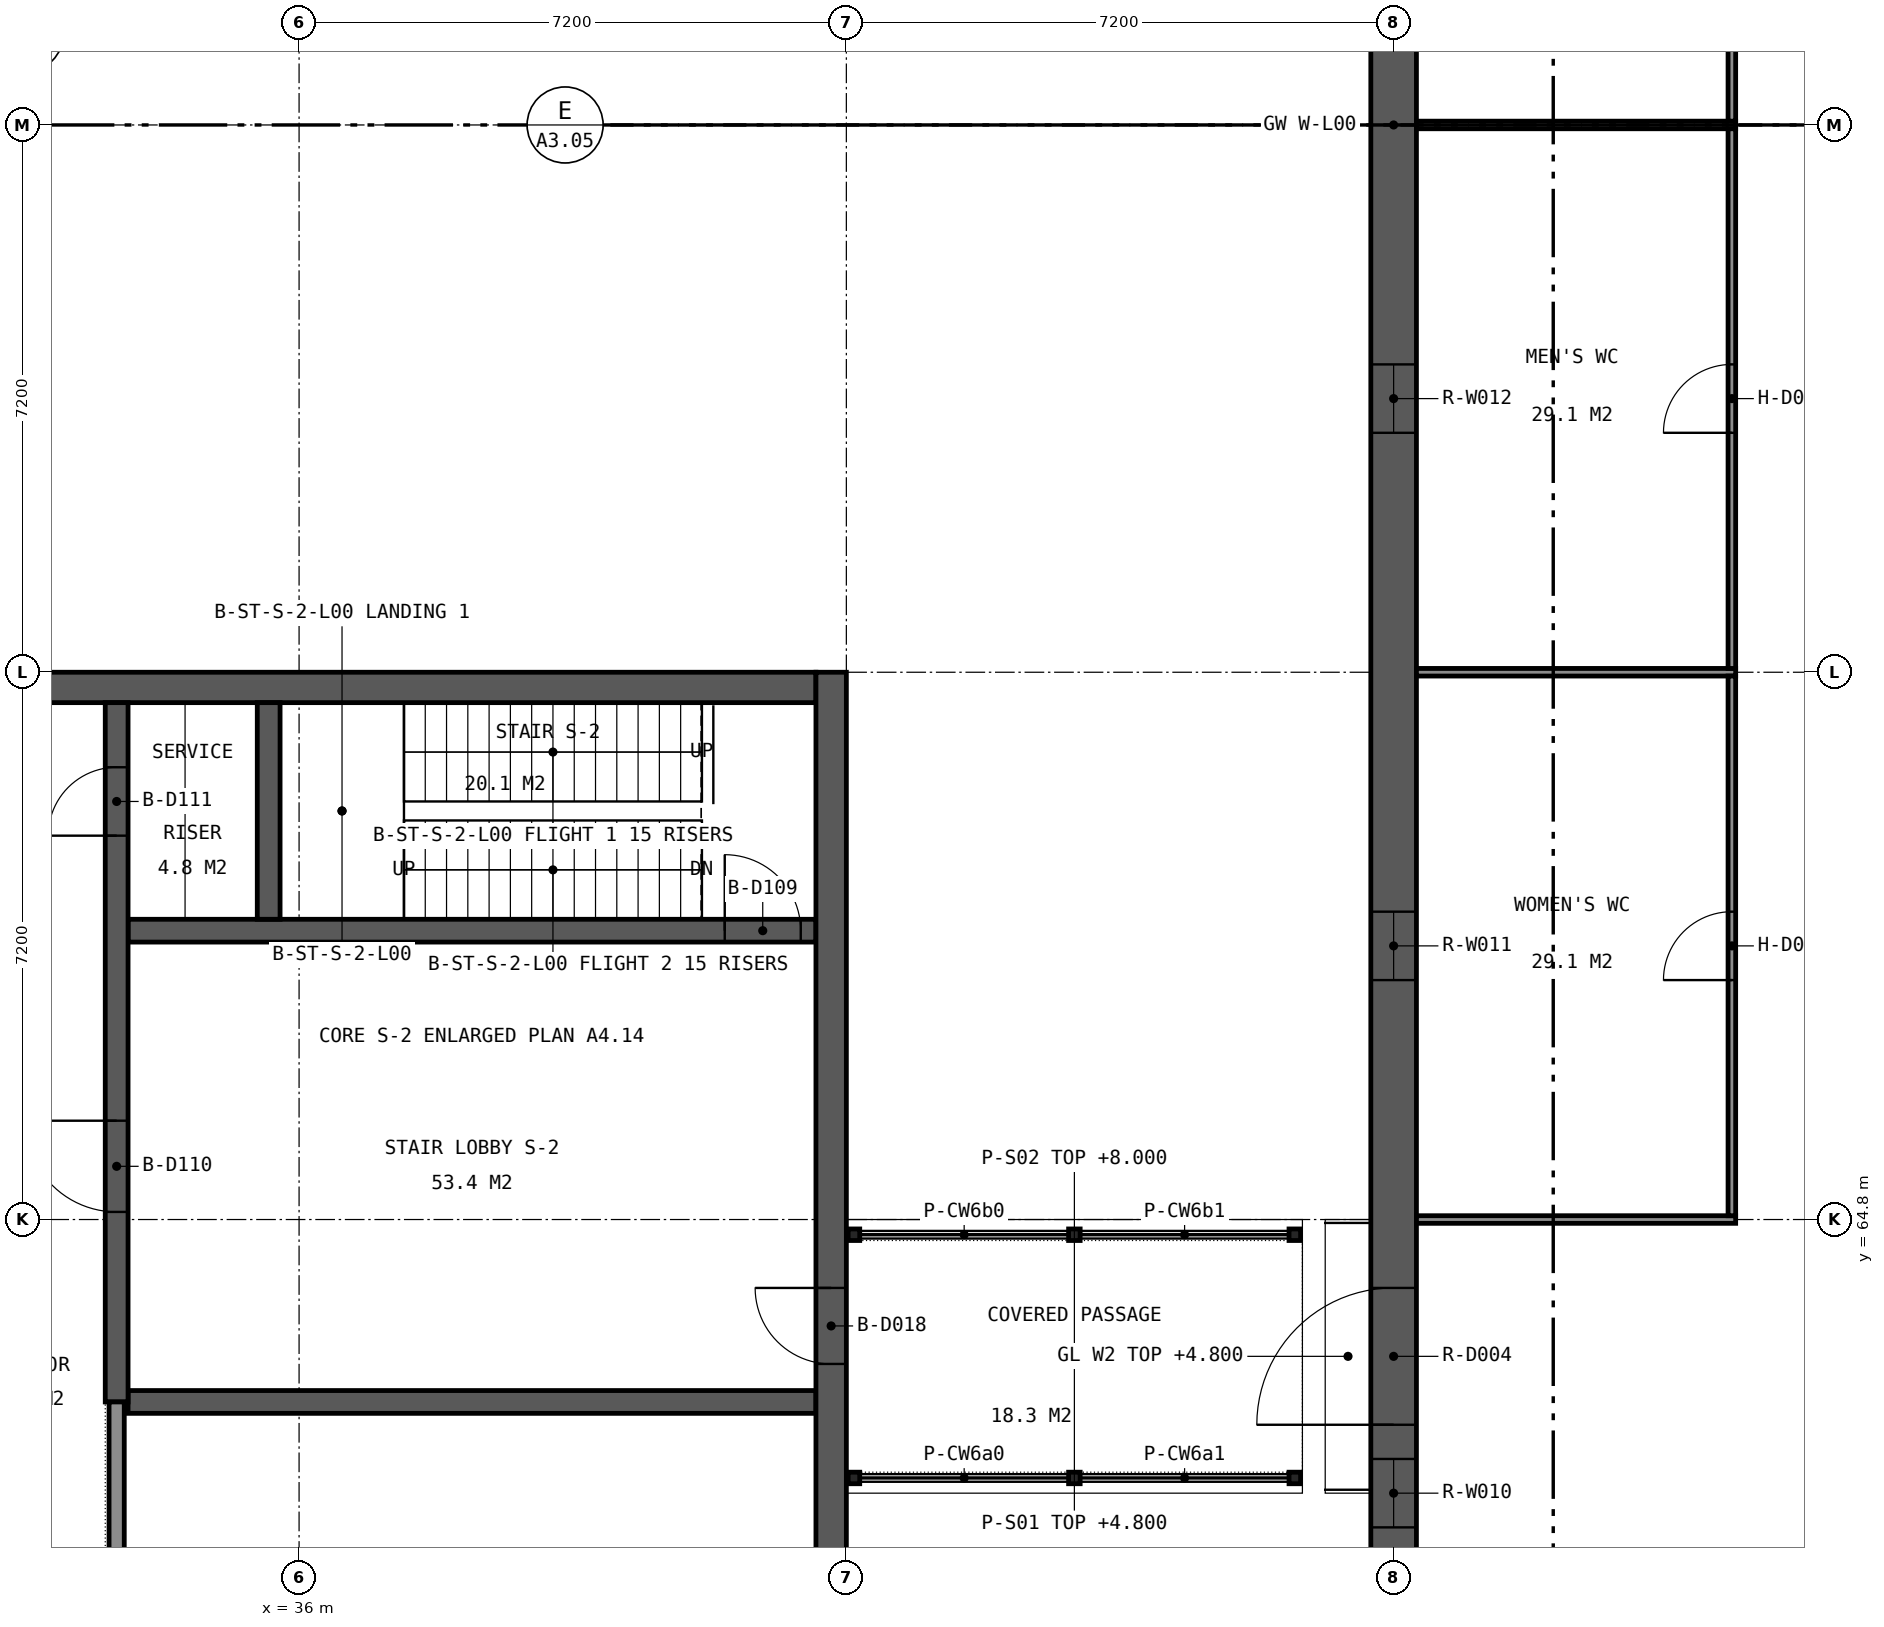
"""IFC4 building model, lengths in metres.
Left out: names, types, materials, properties, quantities, classifications, styles, units other than length and angle.
Written with IfcOpenShell. Run it as: python <this file> out.ifc"""

import sys

from ifc_helpers import new_model, si_unit, direction, frame, frame_2d, origin, origin_2d, place, context, subcontext, project, spatial, rectangle, hollow_rectangle, extrude, element, fill, save


model = new_model("IFC4")
c1 = context("Model", 3, precision=1e-05, world=origin(), true_north=direction((0.0, 1.0)))
c2 = subcontext(c1, "Body", "Model", "MODEL_VIEW")
j1 = project(units=[si_unit("LENGTHUNIT", "METRE"), si_unit("PLANEANGLEUNIT", "RADIAN")], contexts=[c1])
p1 = place(None, origin())
s1 = spatial("IfcSite", under=j1, at=p1, CompositionType="ELEMENT")
p2 = place(p1, origin())
s2 = spatial("IfcBuilding", under=s1, at=p2, CompositionType="ELEMENT")
p3 = place(p2, frame((0.0, 0.0, 4.8)))
s3 = spatial("IfcBuildingStorey", under=s2, at=p3, CompositionType="ELEMENT", Elevation=4.8)
p4 = place(p3, frame((50.4, 52.2, 0.0), z_axis=(0.0, 0.0, 1.0), x_axis=(0.0, 1.0, 0.0)))
e1 = element("IfcWall", 1, at=p4, inside=s3, PredefinedType="SOLIDWALL", context=c2, shape_type="SweptSolid", body=[
    extrude(rectangle(XDim=54.0, YDim=0.6, at=frame_2d((27.0, 0.0))), origin(), (0.0, 0.0, 1.0), 4.8),
])
p5 = place(p4, frame((1.35, 0.0, 0.9)))
e2 = element("IfcOpeningElement", 2, at=p5, cuts=e1, PredefinedType="OPENING", context=c2, shape_type="SweptSolid", body=[
    extrude(rectangle(XDim=0.9, YDim=3.3, at=frame_2d((0.45, 1.65))), frame((0.0, 0.31, 0.0), z_axis=(0.0, -1.0, 0.0), x_axis=(1.0, 0.0, 0.0)), (0.0, 0.0, 1.0), 0.62),
])
p6 = place(p4, frame((8.55, 0.0, 0.9)))
e3 = element("IfcOpeningElement", 3, at=p6, cuts=e1, PredefinedType="OPENING", context=c2, shape_type="SweptSolid", body=[
    extrude(rectangle(XDim=0.9, YDim=3.3, at=frame_2d((0.45, 1.65))), frame((0.0, 0.31, 0.0), z_axis=(0.0, -1.0, 0.0), x_axis=(1.0, 0.0, 0.0)), (0.0, 0.0, 1.0), 0.62),
])
p7 = place(p4, frame((15.75, 0.0, 0.9)))
e4 = element("IfcOpeningElement", 4, at=p7, cuts=e1, PredefinedType="OPENING", context=c2, shape_type="SweptSolid", body=[
    extrude(rectangle(XDim=0.9, YDim=3.3, at=frame_2d((0.45, 1.65))), frame((0.0, 0.31, 0.0), z_axis=(0.0, -1.0, 0.0), x_axis=(1.0, 0.0, 0.0)), (0.0, 0.0, 1.0), 0.62),
])
p8 = place(p4, frame((22.95, 0.0, 0.9)))
e5 = element("IfcOpeningElement", 5, at=p8, cuts=e1, PredefinedType="OPENING", context=c2, shape_type="SweptSolid", body=[
    extrude(rectangle(XDim=0.9, YDim=3.3, at=frame_2d((0.45, 1.65))), frame((0.0, 0.31, 0.0), z_axis=(0.0, -1.0, 0.0), x_axis=(1.0, 0.0, 0.0)), (0.0, 0.0, 1.0), 0.62),
])
p9 = place(p4, frame((30.15, 0.0, 0.9)))
e6 = element("IfcOpeningElement", 6, at=p9, cuts=e1, PredefinedType="OPENING", context=c2, shape_type="SweptSolid", body=[
    extrude(rectangle(XDim=0.9, YDim=3.3, at=frame_2d((0.45, 1.65))), frame((0.0, 0.31, 0.0), z_axis=(0.0, -1.0, 0.0), x_axis=(1.0, 0.0, 0.0)), (0.0, 0.0, 1.0), 0.62),
])
p10 = place(p4, frame((37.35, 0.0, 0.9)))
e7 = element("IfcOpeningElement", 7, at=p10, cuts=e1, PredefinedType="OPENING", context=c2, shape_type="SweptSolid", body=[
    extrude(rectangle(XDim=0.9, YDim=3.3, at=frame_2d((0.45, 1.65))), frame((0.0, 0.31, 0.0), z_axis=(0.0, -1.0, 0.0), x_axis=(1.0, 0.0, 0.0)), (0.0, 0.0, 1.0), 0.62),
])
p11 = place(p4, frame((44.55, 0.0, 0.9)))
e8 = element("IfcOpeningElement", 8, at=p11, cuts=e1, PredefinedType="OPENING", context=c2, shape_type="SweptSolid", body=[
    extrude(rectangle(XDim=0.9, YDim=3.3, at=frame_2d((0.45, 1.65))), frame((0.0, 0.31, 0.0), z_axis=(0.0, -1.0, 0.0), x_axis=(1.0, 0.0, 0.0)), (0.0, 0.0, 1.0), 0.62),
])
p12 = place(p4, frame((51.75, 0.0, 0.9)))
e9 = element("IfcOpeningElement", 9, at=p12, cuts=e1, PredefinedType="OPENING", context=c2, shape_type="SweptSolid", body=[
    extrude(rectangle(XDim=0.9, YDim=3.3, at=frame_2d((0.45, 1.65))), frame((0.0, 0.31, 0.0), z_axis=(0.0, -1.0, 0.0), x_axis=(1.0, 0.0, 0.0)), (0.0, 0.0, 1.0), 0.62),
])
p13 = place(p4, frame((9.9, 0.0, 0.0)))
e10 = element("IfcOpeningElement", 10, at=p13, cuts=e1, PredefinedType="OPENING", context=c2, shape_type="SweptSolid", body=[
    extrude(rectangle(XDim=1.8, YDim=2.4, at=frame_2d((0.9, 1.2))), frame((0.0, 0.31, 0.0), z_axis=(0.0, -1.0, 0.0), x_axis=(1.0, 0.0, 0.0)), (0.0, 0.0, 1.0), 0.62),
])
p14 = place(p4, frame((42.3, 0.0, 0.0)))
e11 = element("IfcOpeningElement", 11, at=p14, cuts=e1, PredefinedType="OPENING", context=c2, shape_type="SweptSolid", body=[
    extrude(rectangle(XDim=1.8, YDim=2.4, at=frame_2d((0.9, 1.2))), frame((0.0, 0.31, 0.0), z_axis=(0.0, -1.0, 0.0), x_axis=(1.0, 0.0, 0.0)), (0.0, 0.0, 1.0), 0.62),
])
p15 = place(p3, frame((33.75, 62.4, 0.0), z_axis=(0.0, 0.0, 1.0), x_axis=(1.0, 0.0, 0.0)))
e12 = element("IfcWall", 12, at=p15, inside=s3, PredefinedType="SHEAR", context=c2, shape_type="SweptSolid", body=[
    extrude(rectangle(XDim=9.05, YDim=0.3, at=frame_2d((4.525, 0.0))), origin(), (0.0, 0.0, 1.0), 4.55),
])
p16 = place(p3, frame((33.75, 68.6, 0.0), z_axis=(0.0, 0.0, 1.0), x_axis=(1.0, 0.0, 0.0)))
e13 = element("IfcWall", 13, at=p16, inside=s3, PredefinedType="SHEAR", context=c2, shape_type="SweptSolid", body=[
    extrude(rectangle(XDim=9.05, YDim=0.3, at=frame_2d((4.525, 0.0))), origin(), (0.0, 0.0, 1.0), 4.55),
])
p17 = place(p16, frame((7.85, 0.0, 0.0)))
e14 = element("IfcOpeningElement", 14, at=p17, cuts=e13, PredefinedType="OPENING", context=c2, shape_type="SweptSolid", body=[
    extrude(rectangle(XDim=1.0, YDim=2.1, at=frame_2d((0.5, 1.05))), frame((0.0, 0.16, 0.0), z_axis=(0.0, -1.0, 0.0), x_axis=(1.0, 0.0, 0.0)), (0.0, 0.0, 1.0), 0.32),
])
p18 = place(p3, frame((29.1, 71.8, 0.0), z_axis=(0.0, 0.0, 1.0), x_axis=(1.0, 0.0, 0.0)))
e15 = element("IfcWall", 15, at=p18, inside=s3, PredefinedType="SHEAR", context=c2, shape_type="SweptSolid", body=[
    extrude(rectangle(XDim=13.7, YDim=0.4, at=frame_2d((6.85, 0.0))), origin(), (0.0, 0.0, 1.0), 4.55),
])
p19 = place(p3, frame((33.6, 62.4, 0.0), z_axis=(0.0, 0.0, 1.0), x_axis=(0.0, 1.0, 0.0)))
e16 = element("IfcWall", 16, at=p19, inside=s3, PredefinedType="SHEAR", context=c2, shape_type="SweptSolid", body=[
    extrude(rectangle(XDim=9.2, YDim=0.3, at=frame_2d((4.6, 0.0))), origin(), (0.0, 0.0, 1.0), 4.55),
])
p20 = place(p19, frame((2.5, 0.0, 0.0)))
e17 = element("IfcOpeningElement", 17, at=p20, cuts=e16, PredefinedType="OPENING", context=c2, shape_type="SweptSolid", body=[
    extrude(rectangle(XDim=1.2, YDim=2.1, at=frame_2d((0.6, 1.05))), frame((0.0, 0.16, 0.0), z_axis=(0.0, -1.0, 0.0), x_axis=(1.0, 0.0, 0.0)), (0.0, 0.0, 1.0), 0.32),
])
p21 = place(p19, frame((7.45, 0.0, 0.0)))
e18 = element("IfcOpeningElement", 18, at=p21, cuts=e16, PredefinedType="OPENING", context=c2, shape_type="SweptSolid", body=[
    extrude(rectangle(XDim=0.9, YDim=2.1, at=frame_2d((0.45, 1.05))), frame((0.0, 0.16, 0.0), z_axis=(0.0, -1.0, 0.0), x_axis=(1.0, 0.0, 0.0)), (0.0, 0.0, 1.0), 0.32),
])
p22 = place(p3, frame((35.6, 68.75, 0.0), z_axis=(0.0, 0.0, 1.0), x_axis=(0.0, 1.0, 0.0)))
e19 = element("IfcWall", 19, at=p22, inside=s3, PredefinedType="SHEAR", context=c2, shape_type="SweptSolid", body=[
    extrude(rectangle(XDim=2.85, YDim=0.3, at=frame_2d((1.425, 0.0))), origin(), (0.0, 0.0, 1.0), 4.55),
])
p23 = place(p3, frame((43.0, 57.9, 0.0), z_axis=(0.0, 0.0, 1.0), x_axis=(0.0, 1.0, 0.0)))
e20 = element("IfcWall", 20, at=p23, inside=s3, PredefinedType="SHEAR", context=c2, shape_type="SweptSolid", body=[
    extrude(rectangle(XDim=14.1, YDim=0.4, at=frame_2d((7.05, 0.0))), origin(), (0.0, 0.0, 1.0), 4.55),
])
p24 = place(p23, frame((5.0, 0.0, 0.0)))
e21 = element("IfcOpeningElement", 21, at=p24, cuts=e20, PredefinedType="OPENING", context=c2, shape_type="SweptSolid", body=[
    extrude(rectangle(XDim=1.0, YDim=2.1, at=frame_2d((0.5, 1.05))), frame((0.0, 0.21, 0.0), z_axis=(0.0, -1.0, 0.0), x_axis=(1.0, 0.0, 0.0)), (0.0, 0.0, 1.0), 0.42),
])
for number, where, z_axis, x_axis in (
    (22, (43.3, 61.4, 0.0), (0.0, 0.0, 1.0), (1.0, 0.0, 0.0)),
    (23, (46.2, 61.4, 0.0), (0.0, 0.0, 1.0), (1.0, 0.0, 0.0)),
    (24, (49.1, 61.4, 0.0), (0.0, 0.0, 1.0), (1.0, 0.0, 0.0)),
    (25, (43.3, 64.6, 0.0), (0.0, 0.0, 1.0), (1.0, 0.0, 0.0)),
    (26, (46.2, 64.6, 0.0), (0.0, 0.0, 1.0), (1.0, 0.0, 0.0)),
    (27, (49.1, 64.6, 0.0), (0.0, 0.0, 1.0), (1.0, 0.0, 0.0)),
):
    element("IfcColumn", number, at=place(p3, frame(where, z_axis=z_axis, x_axis=x_axis)), inside=s3, PredefinedType="COLUMN", context=c2, shape_type="SweptSolid", body=[
        extrude(hollow_rectangle(XDim=0.152, YDim=0.152, WallThickness=0.01, at=origin_2d()), origin(), (0.0, 0.0, 1.0), 2.753),
    ])
for number, where, z_axis, x_axis in (
    (28, (50.7, 64.8, 0.0), (0.0, 0.0, 1.0), (1.0, 0.0, 0.0)),
    (29, (50.7, 72.0, 0.0), (0.0, 0.0, 1.0), (1.0, 0.0, 0.0)),
    (30, (50.7, 79.2, 0.0), (0.0, 0.0, 1.0), (1.0, 0.0, 0.0)),
):
    element("IfcWall", number, at=place(p3, frame(where, z_axis=z_axis, x_axis=x_axis)), inside=s3, PredefinedType="PARTITIONING", context=c2, shape_type="SweptSolid", body=[
        extrude(rectangle(XDim=4.2, YDim=0.1, at=frame_2d((2.1, 0.0))), origin(), (0.0, 0.0, 1.0), 3.95),
    ])
p25 = place(p3, frame((54.85, 64.85, 0.0), z_axis=(0.0, 0.0, 1.0), x_axis=(0.0, 1.0, 0.0)))
e31 = element("IfcWall", 31, at=p25, inside=s3, PredefinedType="PARTITIONING", context=c2, shape_type="SweptSolid", body=[
    extrude(rectangle(XDim=7.1, YDim=0.1, at=frame_2d((3.55, 0.0))), origin(), (0.0, 0.0, 1.0), 3.95),
])
p26 = place(p25, frame((3.1, 0.0, 0.0)))
e32 = element("IfcOpeningElement", 32, at=p26, cuts=e31, PredefinedType="OPENING", context=c2, shape_type="SweptSolid", body=[
    extrude(rectangle(XDim=0.9, YDim=2.1, at=frame_2d((0.45, 1.05))), frame((0.0, 0.06, 0.0), z_axis=(0.0, -1.0, 0.0), x_axis=(1.0, 0.0, 0.0)), (0.0, 0.0, 1.0), 0.12),
])
p27 = place(p3, frame((54.85, 72.05, 0.0), z_axis=(0.0, 0.0, 1.0), x_axis=(0.0, 1.0, 0.0)))
e33 = element("IfcWall", 33, at=p27, inside=s3, PredefinedType="PARTITIONING", context=c2, shape_type="SweptSolid", body=[
    extrude(rectangle(XDim=7.1, YDim=0.1, at=frame_2d((3.55, 0.0))), origin(), (0.0, 0.0, 1.0), 3.95),
])
p28 = place(p27, frame((3.1, 0.0, 0.0)))
e34 = element("IfcOpeningElement", 34, at=p28, cuts=e33, PredefinedType="OPENING", context=c2, shape_type="SweptSolid", body=[
    extrude(rectangle(XDim=0.9, YDim=2.1, at=frame_2d((0.45, 1.05))), frame((0.0, 0.06, 0.0), z_axis=(0.0, -1.0, 0.0), x_axis=(1.0, 0.0, 0.0)), (0.0, 0.0, 1.0), 0.12),
])
p29 = place(p3, frame((54.85, 79.25, 0.0), z_axis=(0.0, 0.0, 1.0), x_axis=(0.0, 1.0, 0.0)))
e35 = element("IfcWall", 35, at=p29, inside=s3, PredefinedType="PARTITIONING", context=c2, shape_type="SweptSolid", body=[
    extrude(rectangle(XDim=7.1, YDim=0.1, at=frame_2d((3.55, 0.0))), origin(), (0.0, 0.0, 1.0), 3.95),
])
p30 = place(p29, frame((3.05, 0.0, 0.0)))
e36 = element("IfcOpeningElement", 36, at=p30, cuts=e35, PredefinedType="OPENING", context=c2, shape_type="SweptSolid", body=[
    extrude(rectangle(XDim=1.0, YDim=2.1, at=frame_2d((0.5, 1.05))), frame((0.0, 0.06, 0.0), z_axis=(0.0, -1.0, 0.0), x_axis=(1.0, 0.0, 0.0)), (0.0, 0.0, 1.0), 0.12),
])
p31 = place(p3, frame((33.6, 38.4, 0.0), z_axis=(0.0, 0.0, 1.0), x_axis=(0.0, 1.0, 0.0)))
e37 = element("IfcWall", 37, at=p31, inside=s3, PredefinedType="PARTITIONING", context=c2, shape_type="SweptSolid", body=[
    extrude(rectangle(XDim=24.0, YDim=0.2, at=frame_2d((12.0, 0.0))), origin(), (0.0, 0.0, 1.0), 3.95),
])
p32 = place(p31, frame((5.1, 0.0, 0.0)))
e38 = element("IfcOpeningElement", 38, at=p32, cuts=e37, PredefinedType="OPENING", context=c2, shape_type="SweptSolid", body=[
    extrude(rectangle(XDim=1.8, YDim=2.1, at=frame_2d((0.9, 1.05))), frame((0.0, 0.11, 0.0), z_axis=(0.0, -1.0, 0.0), x_axis=(1.0, 0.0, 0.0)), (0.0, 0.0, 1.0), 0.22),
])
p33 = place(p31, frame((13.3, 0.0, 0.0)))
e39 = element("IfcOpeningElement", 39, at=p33, cuts=e37, PredefinedType="OPENING", context=c2, shape_type="SweptSolid", body=[
    extrude(rectangle(XDim=1.0, YDim=2.1, at=frame_2d((0.5, 1.05))), frame((0.0, 0.11, 0.0), z_axis=(0.0, -1.0, 0.0), x_axis=(1.0, 0.0, 0.0)), (0.0, 0.0, 1.0), 0.22),
])
p34 = place(p31, frame((18.9, 0.0, 0.0)))
e40 = element("IfcOpeningElement", 40, at=p34, cuts=e37, PredefinedType="OPENING", context=c2, shape_type="SweptSolid", body=[
    extrude(rectangle(XDim=1.8, YDim=2.1, at=frame_2d((0.9, 1.05))), frame((0.0, 0.11, 0.0), z_axis=(0.0, -1.0, 0.0), x_axis=(1.0, 0.0, 0.0)), (0.0, 0.0, 1.0), 0.22),
])
p35 = place(p6, origin())
e41 = element("IfcWindow", 41, at=p35, inside=s3, PartitioningType="SINGLE_PANEL", PredefinedType="WINDOW", context=c2, shape_type="SweptSolid", body=[
    extrude(rectangle(XDim=0.9, YDim=3.3, at=frame_2d((0.45, 1.65))), frame((0.0, 0.03, 0.0), z_axis=(0.0, -1.0, 0.0), x_axis=(1.0, 0.0, 0.0)), (0.0, 0.0, 1.0), 0.06),
])
fill(e3, e41)
p36 = place(p7, origin())
e42 = element("IfcWindow", 42, at=p36, inside=s3, PartitioningType="SINGLE_PANEL", PredefinedType="WINDOW", context=c2, shape_type="SweptSolid", body=[
    extrude(rectangle(XDim=0.9, YDim=3.3, at=frame_2d((0.45, 1.65))), frame((0.0, 0.03, 0.0), z_axis=(0.0, -1.0, 0.0), x_axis=(1.0, 0.0, 0.0)), (0.0, 0.0, 1.0), 0.06),
])
fill(e4, e42)
p37 = place(p8, origin())
e43 = element("IfcWindow", 43, at=p37, inside=s3, PartitioningType="SINGLE_PANEL", PredefinedType="WINDOW", context=c2, shape_type="SweptSolid", body=[
    extrude(rectangle(XDim=0.9, YDim=3.3, at=frame_2d((0.45, 1.65))), frame((0.0, 0.03, 0.0), z_axis=(0.0, -1.0, 0.0), x_axis=(1.0, 0.0, 0.0)), (0.0, 0.0, 1.0), 0.06),
])
fill(e5, e43)
p38 = place(p13, origin())
e44 = element("IfcDoor", 44, at=p38, inside=s3, OperationType="DOUBLE_DOOR_SINGLE_SWING", PredefinedType="DOOR", context=c2, shape_type="SweptSolid", body=[
    extrude(rectangle(XDim=1.8, YDim=2.4, at=frame_2d((0.9, 1.2))), frame((0.0, 0.025, 0.0), z_axis=(0.0, -1.0, 0.0), x_axis=(1.0, 0.0, 0.0)), (0.0, 0.0, 1.0), 0.05),
])
fill(e10, e44)
p39 = place(p24, origin())
e45 = element("IfcDoor", 45, at=p39, inside=s3, OperationType="SINGLE_SWING_RIGHT", PredefinedType="DOOR", context=c2, shape_type="SweptSolid", body=[
    extrude(rectangle(XDim=1.0, YDim=2.1, at=frame_2d((0.5, 1.05))), frame((0.0, 0.025, 0.0), z_axis=(0.0, -1.0, 0.0), x_axis=(1.0, 0.0, 0.0)), (0.0, 0.0, 1.0), 0.05),
])
fill(e21, e45)
p40 = place(p26, origin())
e46 = element("IfcDoor", 46, at=p40, inside=s3, OperationType="SINGLE_SWING_LEFT", PredefinedType="DOOR", context=c2, shape_type="SweptSolid", body=[
    extrude(rectangle(XDim=0.9, YDim=2.1, at=frame_2d((0.45, 1.05))), frame((0.0, 0.025, 0.0), z_axis=(0.0, -1.0, 0.0), x_axis=(1.0, 0.0, 0.0)), (0.0, 0.0, 1.0), 0.05),
])
fill(e32, e46)
p41 = place(p28, origin())
e47 = element("IfcDoor", 47, at=p41, inside=s3, OperationType="SINGLE_SWING_LEFT", PredefinedType="DOOR", context=c2, shape_type="SweptSolid", body=[
    extrude(rectangle(XDim=0.9, YDim=2.1, at=frame_2d((0.45, 1.05))), frame((0.0, 0.025, 0.0), z_axis=(0.0, -1.0, 0.0), x_axis=(1.0, 0.0, 0.0)), (0.0, 0.0, 1.0), 0.05),
])
fill(e34, e47)
p42 = place(p17, origin())
e48 = element("IfcDoor", 48, at=p42, inside=s3, OperationType="SINGLE_SWING_LEFT", PredefinedType="DOOR", context=c2, shape_type="SweptSolid", body=[
    extrude(rectangle(XDim=1.0, YDim=2.1, at=frame_2d((0.5, 1.05))), frame((0.0, 0.025, 0.0), z_axis=(0.0, -1.0, 0.0), x_axis=(1.0, 0.0, 0.0)), (0.0, 0.0, 1.0), 0.05),
])
fill(e14, e48)
p43 = place(p20, origin())
e49 = element("IfcDoor", 49, at=p43, inside=s3, OperationType="SINGLE_SWING_RIGHT", PredefinedType="DOOR", context=c2, shape_type="SweptSolid", body=[
    extrude(rectangle(XDim=1.2, YDim=2.1, at=frame_2d((0.6, 1.05))), frame((0.0, 0.025, 0.0), z_axis=(0.0, -1.0, 0.0), x_axis=(1.0, 0.0, 0.0)), (0.0, 0.0, 1.0), 0.05),
])
fill(e17, e49)
p44 = place(p21, origin())
e50 = element("IfcDoor", 50, at=p44, inside=s3, OperationType="SINGLE_SWING_LEFT", PredefinedType="DOOR", context=c2, shape_type="SweptSolid", body=[
    extrude(rectangle(XDim=0.9, YDim=2.1, at=frame_2d((0.45, 1.05))), frame((0.0, 0.025, 0.0), z_axis=(0.0, -1.0, 0.0), x_axis=(1.0, 0.0, 0.0)), (0.0, 0.0, 1.0), 0.05),
])
fill(e18, e50)
save(model, sys.argv[1])
